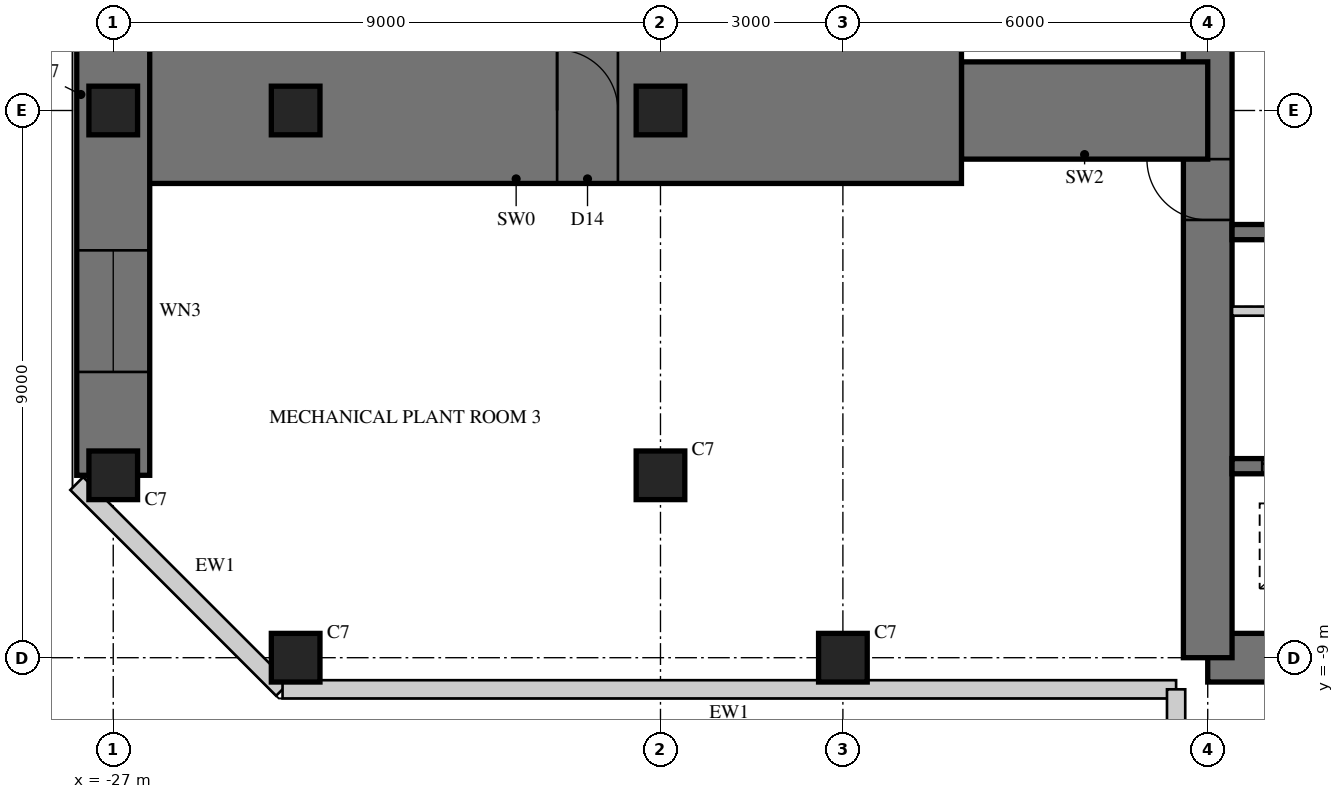
"""IFC4 building model, lengths in metres.
Left out: names, types, materials, properties, quantities, classifications, styles, units other than length and angle.
Written with IfcOpenShell. Run it as: python <this file> out.ifc"""

import sys

from ifc_helpers import new_model, si_unit, direction, frame, frame_2d, origin, origin_2d, place, context, subcontext, project, spatial, rectangle, hollow_rectangle, extrude, element, fill, save


model = new_model("IFC4")
c1 = context("Model", 3, precision=1e-05, world=origin(), true_north=direction((0.0, 1.0)))
c2 = subcontext(c1, "Body", "Model", "MODEL_VIEW")
j1 = project(units=[si_unit("LENGTHUNIT", "METRE"), si_unit("PLANEANGLEUNIT", "RADIAN")], contexts=[c1])
p1 = place(None, origin())
s1 = spatial("IfcSite", under=j1, at=p1, CompositionType="ELEMENT")
p2 = place(p1, origin())
s2 = spatial("IfcBuilding", under=s1, at=p2, CompositionType="ELEMENT")
p3 = place(p2, frame((0.0, 0.0, 252.7)))
s3 = spatial("IfcBuildingStorey", under=s2, at=p3, CompositionType="ELEMENT", Elevation=252.7)
p4 = place(p3, frame((-9.0, -9.0, 0.0), z_axis=(0.0, 0.0, 1.0), x_axis=(1.0, 0.0, 0.0)))
e1 = element("IfcWall", 1, at=p4, inside=s3, PredefinedType="SHEAR", context=c2, shape_type="SweptSolid", body=[
    extrude(rectangle(XDim=18.0, YDim=0.8, at=frame_2d((9.0, 0.0))), origin(), (0.0, 0.0, 1.0), 5.0),
])
p5 = place(p4, frame((9.8, 0.0, 0.0)))
e2 = element("IfcOpeningElement", 2, at=p5, cuts=e1, PredefinedType="OPENING", context=c2, shape_type="SweptSolid", body=[
    extrude(rectangle(XDim=1.0, YDim=2.4, at=frame_2d((0.5, 1.2))), frame((0.0, 0.41, 0.0), z_axis=(0.0, -1.0, 0.0), x_axis=(1.0, 0.0, 0.0)), (0.0, 0.0, 1.0), 0.82),
])
p6 = place(p3, frame((-9.0, 9.0, 0.0), z_axis=(0.0, 0.0, 1.0), x_axis=(0.0, -1.0, 0.0)))
e3 = element("IfcWall", 3, at=p6, inside=s3, PredefinedType="SHEAR", context=c2, shape_type="SweptSolid", body=[
    extrude(rectangle(XDim=18.0, YDim=0.8, at=frame_2d((9.0, 0.0))), origin(), (0.0, 0.0, 1.0), 5.0),
])
p7 = place(p6, frame((9.8, 0.0, 0.0)))
e4 = element("IfcOpeningElement", 4, at=p7, cuts=e3, PredefinedType="OPENING", context=c2, shape_type="SweptSolid", body=[
    extrude(rectangle(XDim=1.0, YDim=2.4, at=frame_2d((0.5, 1.2))), frame((0.0, 0.41, 0.0), z_axis=(0.0, -1.0, 0.0), x_axis=(1.0, 0.0, 0.0)), (0.0, 0.0, 1.0), 0.82),
])
p8 = place(p3, frame((-1.925, -2.0, 0.0), z_axis=(0.0, 0.0, 1.0), x_axis=(-1.0, 0.0, 0.0)))
e5 = element("IfcWall", 5, at=p8, inside=s3, PredefinedType="SHEAR", context=c2, shape_type="SweptSolid", body=[
    extrude(rectangle(XDim=6.675, YDim=0.25, at=frame_2d((3.337, 0.0))), origin(), (0.0, 0.0, 1.0), 5.0),
])
p9 = place(p3, frame((-1.925, -5.85, 0.0), z_axis=(0.0, 0.0, 1.0), x_axis=(-1.0, 0.0, 0.0)))
e6 = element("IfcWall", 6, at=p9, inside=s3, PredefinedType="SHEAR", context=c2, shape_type="SweptSolid", body=[
    extrude(rectangle(XDim=6.675, YDim=0.25, at=frame_2d((3.337, 0.0))), origin(), (0.0, 0.0, 1.0), 5.0),
])
p10 = place(p9, frame((0.496, 0.0, 0.0)))
e7 = element("IfcOpeningElement", 7, at=p10, cuts=e6, PredefinedType="OPENING", context=c2, shape_type="SweptSolid", body=[
    extrude(rectangle(XDim=1.1, YDim=2.2, at=frame_2d((0.55, 1.1))), frame((0.0, 0.135, 0.0), z_axis=(0.0, -1.0, 0.0), x_axis=(1.0, 0.0, 0.0)), (0.0, 0.0, 1.0), 0.27),
])
p11 = place(p9, frame((2.788, 0.0, 0.0)))
e8 = element("IfcOpeningElement", 8, at=p11, cuts=e6, PredefinedType="OPENING", context=c2, shape_type="SweptSolid", body=[
    extrude(rectangle(XDim=1.1, YDim=2.2, at=frame_2d((0.55, 1.1))), frame((0.0, 0.135, 0.0), z_axis=(0.0, -1.0, 0.0), x_axis=(1.0, 0.0, 0.0)), (0.0, 0.0, 1.0), 0.27),
])
p12 = place(p9, frame((5.079, 0.0, 0.0)))
e9 = element("IfcOpeningElement", 9, at=p12, cuts=e6, PredefinedType="OPENING", context=c2, shape_type="SweptSolid", body=[
    extrude(rectangle(XDim=1.1, YDim=2.2, at=frame_2d((0.55, 1.1))), frame((0.0, 0.135, 0.0), z_axis=(0.0, -1.0, 0.0), x_axis=(1.0, 0.0, 0.0)), (0.0, 0.0, 1.0), 0.27),
])
p13 = place(p3, frame((-1.925, -3.3, 0.0), z_axis=(0.0, 0.0, 1.0), x_axis=(-1.0, 0.0, 0.0)))
e10 = element("IfcWall", 10, at=p13, inside=s3, PredefinedType="PARTITIONING", context=c2, shape_type="SweptSolid", body=[
    extrude(rectangle(XDim=6.675, YDim=0.15, at=frame_2d((3.337, 0.0))), origin(), (0.0, 0.0, 1.0), 5.0),
])
p14 = place(p13, frame((0.075, 0.0, 0.0)))
e11 = element("IfcOpeningElement", 11, at=p14, cuts=e10, PredefinedType="OPENING", context=c2, shape_type="SweptSolid", body=[
    extrude(rectangle(XDim=0.8, YDim=2.1, at=frame_2d((0.4, 1.05))), frame((0.0, 0.085, 0.0), z_axis=(0.0, -1.0, 0.0), x_axis=(1.0, 0.0, 0.0)), (0.0, 0.0, 1.0), 0.17),
])
p15 = place(p13, frame((3.675, 0.0, 0.0)))
e12 = element("IfcOpeningElement", 12, at=p15, cuts=e10, PredefinedType="OPENING", context=c2, shape_type="SweptSolid", body=[
    extrude(rectangle(XDim=0.8, YDim=2.1, at=frame_2d((0.4, 1.05))), frame((0.0, 0.085, 0.0), z_axis=(0.0, -1.0, 0.0), x_axis=(1.0, 0.0, 0.0)), (0.0, 0.0, 1.0), 0.17),
])
p16 = place(p3, frame((-9.0, 0.0, 0.0), z_axis=(0.0, 0.0, 1.0), x_axis=(-1.0, 0.0, 0.0)))
e13 = element("IfcWall", 13, at=p16, inside=s3, PredefinedType="SHEAR", context=c2, shape_type="SweptSolid", body=[
    extrude(rectangle(XDim=4.05, YDim=1.6, at=frame_2d((2.025, 0.0))), origin(), (0.0, 0.0, 1.0), 5.0),
])
p17 = place(p3, frame((-13.05, 0.0, 0.0), z_axis=(0.0, 0.0, 1.0), x_axis=(-1.0, 0.0, 0.0)))
e14 = element("IfcWall", 14, at=p17, inside=s3, PredefinedType="SHEAR", context=c2, shape_type="SweptSolid", body=[
    extrude(rectangle(XDim=13.95, YDim=2.4, at=frame_2d((6.975, 0.0))), origin(), (0.0, 0.0, 1.0), 5.0),
])
p18 = place(p17, frame((5.65, 0.0, 0.0)))
e15 = element("IfcOpeningElement", 15, at=p18, cuts=e14, PredefinedType="OPENING", context=c2, shape_type="SweptSolid", body=[
    extrude(rectangle(XDim=1.0, YDim=2.2, at=frame_2d((0.5, 1.1))), frame((0.0, 1.21, 0.0), z_axis=(0.0, -1.0, 0.0), x_axis=(1.0, 0.0, 0.0)), (0.0, 0.0, 1.0), 2.42),
])
p19 = place(p3, frame((-27.0, 6.0, 0.0), z_axis=(0.0, 0.0, 1.0), x_axis=(0.0, -1.0, 0.0)))
e16 = element("IfcWall", 16, at=p19, inside=s3, PredefinedType="SHEAR", context=c2, shape_type="SweptSolid", body=[
    extrude(rectangle(XDim=12.0, YDim=1.2, at=frame_2d((6.0, 0.0))), origin(), (0.0, 0.0, 1.0), 5.0),
])
p20 = place(p19, frame((1.7, 0.0, 0.8)))
e17 = element("IfcOpeningElement", 17, at=p20, cuts=e16, PredefinedType="OPENING", context=c2, shape_type="SweptSolid", body=[
    extrude(rectangle(XDim=2.0, YDim=2.5, at=frame_2d((1.0, 1.25))), frame((0.0, 0.61, 0.0), z_axis=(0.0, -1.0, 0.0), x_axis=(1.0, 0.0, 0.0)), (0.0, 0.0, 1.0), 1.22),
])
p21 = place(p19, frame((8.3, 0.0, 0.8)))
e18 = element("IfcOpeningElement", 18, at=p21, cuts=e16, PredefinedType="OPENING", context=c2, shape_type="SweptSolid", body=[
    extrude(rectangle(XDim=2.0, YDim=2.5, at=frame_2d((1.0, 1.25))), frame((0.0, 0.61, 0.0), z_axis=(0.0, -1.0, 0.0), x_axis=(1.0, 0.0, 0.0)), (0.0, 0.0, 1.0), 1.22),
])
for number, where, z_axis, x_axis in (
    (19, (-15.0, -9.0, 0.0), (0.0, 0.0, 1.0), (1.0, 0.0, 0.0)),
    (20, (-24.0, -9.0, 0.0), (0.0, 0.0, 1.0), (1.0, 0.0, 0.0)),
    (21, (-27.0, 0.0, 0.0), (0.0, 0.0, 1.0), (1.0, 0.0, 0.0)),
    (22, (-27.0, -6.0, 0.0), (0.0, 0.0, 1.0), (1.0, 0.0, 0.0)),
    (23, (-18.0, 0.0, 0.0), (0.0, 0.0, 1.0), (1.0, 0.0, 0.0)),
    (24, (-18.0, -6.0, 0.0), (0.0, 0.0, 1.0), (1.0, 0.0, 0.0)),
    (25, (-24.0, 0.0, 0.0), (0.0, 0.0, 1.0), (1.0, 0.0, 0.0)),
):
    element("IfcColumn", number, at=place(p3, frame(where, z_axis=z_axis, x_axis=x_axis)), inside=s3, PredefinedType="COLUMN", context=c2, shape_type="SweptSolid", body=[
        extrude(rectangle(XDim=0.8, YDim=0.8, at=origin_2d()), origin(), (0.0, 0.0, 1.0), 5.0),
    ])
p22 = place(p3, frame((-27.6, -6.135, 0.0), z_axis=(0.0, 0.0, 1.0), x_axis=(0.707132283189, -0.707081278264, 0.0)))
e26 = element("IfcWall", 26, at=p22, inside=s3, PredefinedType="SOLIDWALL", context=c2, shape_type="SweptSolid", body=[
    extrude(rectangle(XDim=4.787, YDim=0.3, at=frame_2d((2.393, 0.0))), origin(), (0.0, 0.0, 1.0), 4.82),
])
p23 = place(p3, frame((-24.215, -9.52, 0.0), z_axis=(0.0, 0.0, 1.0), x_axis=(1.0, 0.0, 0.0)))
e27 = element("IfcWall", 27, at=p23, inside=s3, PredefinedType="SOLIDWALL", context=c2, shape_type="SweptSolid", body=[
    extrude(rectangle(XDim=14.695, YDim=0.3, at=frame_2d((7.348, 0.0))), origin(), (0.0, 0.0, 1.0), 4.82),
])
p24 = place(p3, frame((-9.52, -9.52, 0.0), z_axis=(0.0, 0.0, 1.0), x_axis=(0.0, -1.0, 0.0)))
e28 = element("IfcWall", 28, at=p24, inside=s3, PredefinedType="SOLIDWALL", context=c2, shape_type="SweptSolid", body=[
    extrude(rectangle(XDim=5.695, YDim=0.3, at=frame_2d((2.848, 0.0))), origin(), (0.0, 0.0, 1.0), 4.82),
])
p25 = place(p21, origin())
e29 = element("IfcWindow", 29, at=p25, inside=s3, PartitioningType="SINGLE_PANEL", PredefinedType="WINDOW", context=c2, shape_type="SweptSolid", body=[
    extrude(hollow_rectangle(XDim=2.0, YDim=2.5, WallThickness=0.06, at=frame_2d((1.0, 1.25))), frame((0.0, 0.03, 0.0), z_axis=(0.0, -1.0, 0.0), x_axis=(1.0, 0.0, 0.0)), (0.0, 0.0, 1.0), 0.06),
    extrude(rectangle(XDim=1.879, YDim=2.379, at=frame_2d((1.0, 1.25))), frame((0.0, 0.03, 0.0), z_axis=(0.0, -1.0, 0.0), x_axis=(1.0, 0.0, 0.0)), (0.0, 0.0, 1.0), 0.06),
])
fill(e18, e29)
p26 = place(p18, frame((1.0, 0.0, 0.0), z_axis=(0.0, 0.0, 1.0), x_axis=(-1.0, 0.0, 0.0)))
e30 = element("IfcDoor", 30, at=p26, inside=s3, OperationType="SINGLE_SWING_LEFT", PredefinedType="DOOR", context=c2, shape_type="SweptSolid", body=[
    extrude(rectangle(XDim=1.0, YDim=2.2, at=frame_2d((0.5, 1.1))), frame((0.0, 0.025, 0.0), z_axis=(0.0, -1.0, 0.0), x_axis=(1.0, 0.0, 0.0)), (0.0, 0.0, 1.0), 0.05),
])
fill(e15, e30)
p27 = place(p7, frame((1.0, 0.0, 0.0), z_axis=(0.0, 0.0, 1.0), x_axis=(-1.0, 0.0, 0.0)))
e31 = element("IfcDoor", 31, at=p27, inside=s3, OperationType="SINGLE_SWING_RIGHT", PredefinedType="DOOR", context=c2, shape_type="SweptSolid", body=[
    extrude(rectangle(XDim=1.0, YDim=2.4, at=frame_2d((0.5, 1.2))), frame((0.0, -0.005, 0.0), z_axis=(0.0, -1.0, 0.0), x_axis=(1.0, 0.0, 0.0)), (0.0, 0.0, 1.0), 0.05),
])
fill(e4, e31)
p28 = place(p12, origin())
e32 = element("IfcDoor", 32, at=p28, inside=s3, OperationType="DOUBLE_DOOR_SLIDING", PredefinedType="DOOR", context=c2, shape_type="SweptSolid", body=[
    extrude(rectangle(XDim=1.1, YDim=2.2, at=frame_2d((0.55, 1.1))), frame((0.0, 0.025, 0.0), z_axis=(0.0, -1.0, 0.0), x_axis=(1.0, 0.0, 0.0)), (0.0, 0.0, 1.0), 0.05),
])
fill(e9, e32)
save(model, sys.argv[1])
